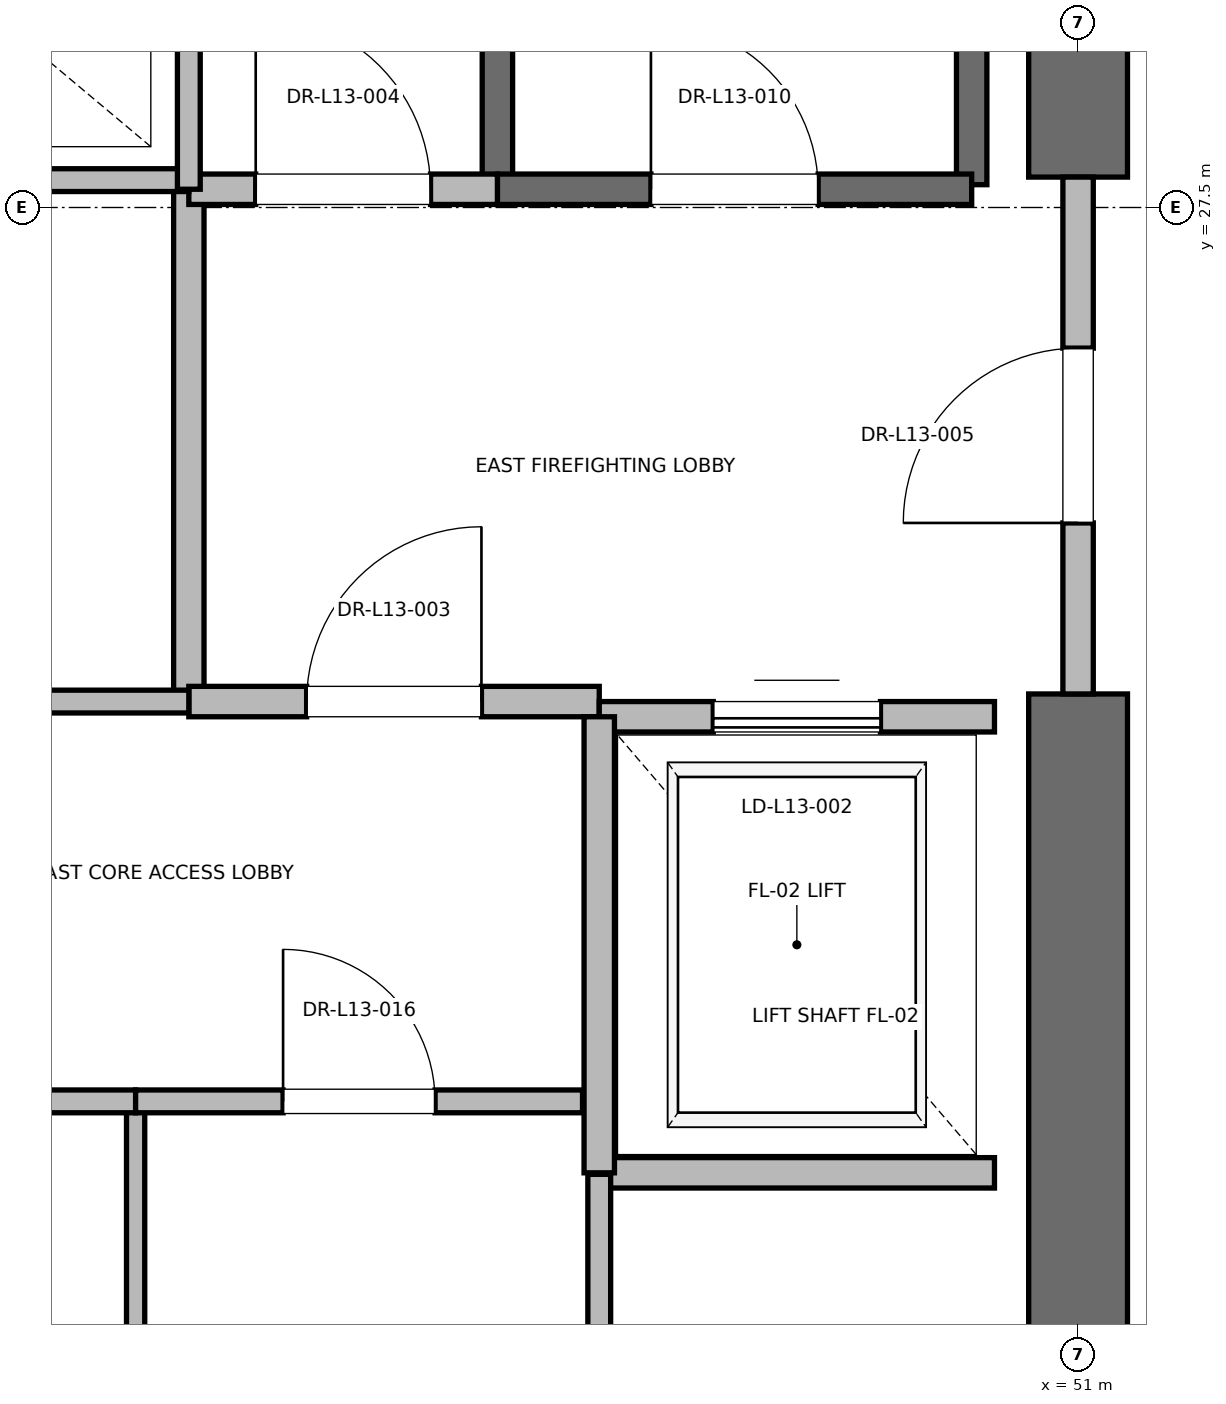
"""IFC4 building model, lengths in metres.
Left out: names, types, materials, properties, quantities, classifications, styles, units other than length and angle.
Written with IfcOpenShell. Run it as: python <this file> out.ifc"""

import sys

from ifc_helpers import new_model, si_unit, direction, frame, frame_2d, origin, place, context, subcontext, project, spatial, rectangle, extrude, element, fill, save


model = new_model("IFC4")
c1 = context("Model", 3, precision=1e-05, world=origin(), true_north=direction((0.0, 1.0)))
c2 = subcontext(c1, "Body", "Model", "MODEL_VIEW")
j1 = project(units=[si_unit("LENGTHUNIT", "METRE"), si_unit("PLANEANGLEUNIT", "RADIAN")], contexts=[c1])
p1 = place(None, origin())
s1 = spatial("IfcSite", under=j1, at=p1, CompositionType="ELEMENT")
p2 = place(p1, origin())
s2 = spatial("IfcBuilding", under=s1, at=p2, CompositionType="ELEMENT")
p3 = place(p2, frame((0.0, 0.0, 59.6)))
s3 = spatial("IfcBuildingStorey", under=s2, at=p3, CompositionType="ELEMENT", Elevation=59.6)
p4 = place(p3, frame((51.0, 18.5, 0.0), z_axis=(0.0, 0.0, 1.0), x_axis=(0.0, 1.0, 0.0)))
e1 = element("IfcWall", 1, at=p4, inside=s3, PredefinedType="SHEAR", context=c2, shape_type="SweptSolid", body=[
    extrude(rectangle(XDim=5.8, YDim=0.65, at=frame_2d((2.9, 0.0))), origin(), (0.0, 0.0, 1.0), 3.76),
])
p5 = place(p3, frame((51.0, 27.7, 0.0), z_axis=(0.0, 0.0, 1.0), x_axis=(0.0, 1.0, 0.0)))
e2 = element("IfcWall", 2, at=p5, inside=s3, PredefinedType="SHEAR", context=c2, shape_type="SweptSolid", body=[
    extrude(rectangle(XDim=8.8, YDim=0.65, at=frame_2d((4.4, 0.0))), origin(), (0.0, 0.0, 1.0), 3.76),
])
p6 = place(p3, frame((50.3, 27.65, 0.0), z_axis=(0.0, 0.0, 1.0), x_axis=(0.0, 1.0, 0.0)))
e3 = element("IfcWall", 3, at=p6, inside=s3, PredefinedType="SOLIDWALL", context=c2, shape_type="SweptSolid", body=[
    extrude(rectangle(XDim=8.15, YDim=0.2, at=frame_2d((4.075, 0.0))), origin(), (0.0, 0.0, 1.0), 3.76),
])
p7 = place(p3, frame((47.18, 27.62, 0.0), z_axis=(0.0, 0.0, 1.0), x_axis=(0.0, 1.0, 0.0)))
e4 = element("IfcWall", 4, at=p7, inside=s3, PredefinedType="SOLIDWALL", context=c2, shape_type="SweptSolid", body=[
    extrude(rectangle(XDim=8.18, YDim=0.2, at=frame_2d((4.09, 0.0))), origin(), (0.0, 0.0, 1.0), 3.76),
])
p8 = place(p3, frame((47.18, 27.62, 0.0), z_axis=(0.0, 0.0, 1.0), x_axis=(1.0, 0.0, 0.0)))
e5 = element("IfcWall", 5, at=p8, inside=s3, PredefinedType="SOLIDWALL", context=c2, shape_type="SweptSolid", body=[
    extrude(rectangle(XDim=3.12, YDim=0.2, at=frame_2d((1.56, 0.0))), origin(), (0.0, 0.0, 1.0), 3.76),
])
p9 = place(p8, frame((1.01, 0.0, 0.0)))
e6 = element("IfcOpeningElement", 6, at=p9, cuts=e5, PredefinedType="OPENING", context=c2, shape_type="SweptSolid", body=[
    extrude(rectangle(XDim=1.1, YDim=2.15, at=frame_2d((0.55, 1.075))), frame((0.0, 0.1, 0.0), z_axis=(0.0, -1.0, 0.0), x_axis=(1.0, 0.0, 0.0)), (0.0, 0.0, 1.0), 0.2),
])
p10 = place(p3, frame((45.15, 24.25, 0.0), z_axis=(0.0, 0.0, 1.0), x_axis=(0.0, 1.0, 0.0)))
e7 = element("IfcWall", 7, at=p10, inside=s3, PredefinedType="PARTITIONING", context=c2, shape_type="SweptSolid", body=[
    extrude(rectangle(XDim=3.37, YDim=0.2, at=frame_2d((1.685, 0.0))), origin(), (0.0, 0.0, 1.0), 3.76),
])
p11 = place(p3, frame((45.15, 24.25, 0.0), z_axis=(0.0, 0.0, 1.0), x_axis=(1.0, 0.0, 0.0)))
e8 = element("IfcWall", 8, at=p11, inside=s3, PredefinedType="PARTITIONING", context=c2, shape_type="SweptSolid", body=[
    extrude(rectangle(XDim=2.7, YDim=0.2, at=frame_2d((1.35, 0.0))), origin(), (0.0, 0.0, 1.0), 3.76),
])
p12 = place(p11, frame((0.775, 0.0, 0.0)))
e9 = element("IfcOpeningElement", 9, at=p12, cuts=e8, PredefinedType="OPENING", context=c2, shape_type="SweptSolid", body=[
    extrude(rectangle(XDim=1.15, YDim=2.2, at=frame_2d((0.575, 1.1))), frame((0.0, 0.1, 0.0), z_axis=(0.0, -1.0, 0.0), x_axis=(1.0, 0.0, 0.0)), (0.0, 0.0, 1.0), 0.2),
])
p13 = place(p3, frame((45.15, 27.62, 0.0), z_axis=(0.0, 0.0, 1.0), x_axis=(1.0, 0.0, 0.0)))
e10 = element("IfcWall", 10, at=p13, inside=s3, PredefinedType="PARTITIONING", context=c2, shape_type="SweptSolid", body=[
    extrude(rectangle(XDim=2.03, YDim=0.2, at=frame_2d((1.015, 0.0))), origin(), (0.0, 0.0, 1.0), 3.76),
])
p14 = place(p13, frame((0.44, 0.0, 0.0)))
e11 = element("IfcOpeningElement", 11, at=p14, cuts=e10, PredefinedType="OPENING", context=c2, shape_type="SweptSolid", body=[
    extrude(rectangle(XDim=1.15, YDim=2.2, at=frame_2d((0.575, 1.1))), frame((0.0, 0.1, 0.0), z_axis=(0.0, -1.0, 0.0), x_axis=(1.0, 0.0, 0.0)), (0.0, 0.0, 1.0), 0.2),
])
p15 = place(p3, frame((51.0, 24.3, 0.0), z_axis=(0.0, 0.0, 1.0), x_axis=(0.0, 1.0, 0.0)))
e12 = element("IfcWall", 12, at=p15, inside=s3, PredefinedType="PARTITIONING", context=c2, shape_type="SweptSolid", body=[
    extrude(rectangle(XDim=3.4, YDim=0.2, at=frame_2d((1.7, 0.0))), origin(), (0.0, 0.0, 1.0), 2.54),
])
p16 = place(p15, frame((1.125, 0.0, 0.0)))
e13 = element("IfcOpeningElement", 13, at=p16, cuts=e12, PredefinedType="OPENING", context=c2, shape_type="SweptSolid", body=[
    extrude(rectangle(XDim=1.15, YDim=2.2, at=frame_2d((0.575, 1.1))), frame((0.0, 0.1, 0.0), z_axis=(0.0, -1.0, 0.0), x_axis=(1.0, 0.0, 0.0)), (0.0, 0.0, 1.0), 0.2),
])
p17 = place(p3, frame((47.85, 21.15, 0.0), z_axis=(0.0, 0.0, 1.0), x_axis=(1.0, 0.0, 0.0)))
e14 = element("IfcWall", 14, at=p17, inside=s3, PredefinedType="SOLIDWALL", context=c2, shape_type="SweptSolid", body=[
    extrude(rectangle(XDim=2.6, YDim=0.2, at=frame_2d((1.3, 0.0))), origin(), (0.0, 0.0, 1.0), 3.76),
])
p18 = place(p3, frame((50.45, 24.15, 0.0), z_axis=(0.0, 0.0, 1.0), x_axis=(-1.0, 0.0, 0.0)))
e15 = element("IfcWall", 15, at=p18, inside=s3, PredefinedType="SOLIDWALL", context=c2, shape_type="SweptSolid", body=[
    extrude(rectangle(XDim=2.6, YDim=0.2, at=frame_2d((1.3, 0.0))), origin(), (0.0, 0.0, 1.0), 2.54),
])
p19 = place(p18, frame((0.75, 0.0, 0.0)))
e16 = element("IfcOpeningElement", 16, at=p19, cuts=e15, PredefinedType="OPENING", context=c2, shape_type="SweptSolid", body=[
    extrude(rectangle(XDim=1.1, YDim=2.2, at=frame_2d((0.55, 1.1))), frame((0.0, 0.1, 0.0), z_axis=(0.0, -1.0, 0.0), x_axis=(1.0, 0.0, 0.0)), (0.0, 0.0, 1.0), 0.2),
])
p20 = place(p3, frame((47.85, 24.15, 0.0), z_axis=(0.0, 0.0, 1.0), x_axis=(0.0, -1.0, 0.0)))
e17 = element("IfcWall", 17, at=p20, inside=s3, PredefinedType="SOLIDWALL", context=c2, shape_type="SweptSolid", body=[
    extrude(rectangle(XDim=3.0, YDim=0.2, at=frame_2d((1.5, 0.0))), origin(), (0.0, 0.0, 1.0), 3.76),
])
p21 = place(p3, frame((41.56, 27.68, 0.0), z_axis=(0.0, 0.0, 1.0), x_axis=(1.0, 0.0, 0.0)))
e18 = element("IfcWall", 18, at=p21, inside=s3, PredefinedType="PARTITIONING", context=c2, shape_type="SweptSolid", body=[
    extrude(rectangle(XDim=3.59, YDim=0.15, at=frame_2d((1.795, 0.0))), origin(), (0.0, 0.0, 1.0), 2.85),
])
p22 = place(p3, frame((47.85, 18.6, 0.0), z_axis=(0.0, 0.0, 1.0), x_axis=(0.0, 1.0, 0.0)))
e19 = element("IfcWall", 19, at=p22, inside=s3, PredefinedType="PARTITIONING", context=c2, shape_type="SweptSolid", body=[
    extrude(rectangle(XDim=2.54, YDim=0.15, at=frame_2d((1.27, 0.0))), origin(), (0.0, 0.0, 1.0), 2.85),
])
p23 = place(p3, frame((44.8, 18.6, 0.0), z_axis=(0.0, 0.0, 1.0), x_axis=(0.0, 1.0, 0.0)))
e20 = element("IfcWall", 20, at=p23, inside=s3, PredefinedType="PARTITIONING", context=c2, shape_type="SweptSolid", body=[
    extrude(rectangle(XDim=3.02, YDim=0.12, at=frame_2d((1.51, 0.0))), origin(), (0.0, 0.0, 1.0), 2.85),
])
p24 = place(p3, frame((41.76, 21.62, 0.0), z_axis=(0.0, 0.0, 1.0), x_axis=(1.0, 0.0, 0.0)))
e21 = element("IfcWall", 21, at=p24, inside=s3, PredefinedType="PARTITIONING", context=c2, shape_type="SweptSolid", body=[
    extrude(rectangle(XDim=3.04, YDim=0.15, at=frame_2d((1.52, 0.0))), origin(), (0.0, 0.0, 1.0), 2.85),
])
p25 = place(p24, frame((1.02, 0.0, 0.0)))
e22 = element("IfcOpeningElement", 22, at=p25, cuts=e21, PredefinedType="OPENING", context=c2, shape_type="SweptSolid", body=[
    extrude(rectangle(XDim=1.0, YDim=2.15, at=frame_2d((0.5, 1.075))), frame((0.0, 0.075, 0.0), z_axis=(0.0, -1.0, 0.0), x_axis=(1.0, 0.0, 0.0)), (0.0, 0.0, 1.0), 0.15),
])
p26 = place(p3, frame((44.8, 21.62, 0.0), z_axis=(0.0, 0.0, 1.0), x_axis=(1.0, 0.0, 0.0)))
e23 = element("IfcWall", 23, at=p26, inside=s3, PredefinedType="PARTITIONING", context=c2, shape_type="SweptSolid", body=[
    extrude(rectangle(XDim=2.94, YDim=0.15, at=frame_2d((1.47, 0.0))), origin(), (0.0, 0.0, 1.0), 2.85),
])
p27 = place(p26, frame((0.97, 0.0, 0.0)))
e24 = element("IfcOpeningElement", 24, at=p27, cuts=e23, PredefinedType="OPENING", context=c2, shape_type="SweptSolid", body=[
    extrude(rectangle(XDim=1.0, YDim=2.15, at=frame_2d((0.5, 1.075))), frame((0.0, 0.075, 0.0), z_axis=(0.0, -1.0, 0.0), x_axis=(1.0, 0.0, 0.0)), (0.0, 0.0, 1.0), 0.15),
])
p28 = place(p3, frame((41.76, 24.25, 0.0), z_axis=(0.0, 0.0, 1.0), x_axis=(1.0, 0.0, 0.0)))
e25 = element("IfcWall", 25, at=p28, inside=s3, PredefinedType="PARTITIONING", context=c2, shape_type="SweptSolid", body=[
    extrude(rectangle(XDim=3.39, YDim=0.15, at=frame_2d((1.695, 0.0))), origin(), (0.0, 0.0, 1.0), 2.85),
])
p29 = place(p28, frame((1.255, 0.0, 0.0)))
e26 = element("IfcOpeningElement", 26, at=p29, cuts=e25, PredefinedType="OPENING", context=c2, shape_type="SweptSolid", body=[
    extrude(rectangle(XDim=0.88, YDim=2.1, at=frame_2d((0.44, 1.05))), frame((0.0, 0.075, 0.0), z_axis=(0.0, -1.0, 0.0), x_axis=(1.0, 0.0, 0.0)), (0.0, 0.0, 1.0), 0.15),
])
p30 = place(p3, frame((45.15, 27.62, 0.0), z_axis=(0.0, 0.0, 1.0), x_axis=(0.0, 1.0, 0.0)))
e27 = element("IfcWall", 27, at=p30, inside=s3, PredefinedType="PARTITIONING", context=c2, shape_type="SweptSolid", body=[
    extrude(rectangle(XDim=3.1, YDim=0.15, at=frame_2d((1.55, 0.0))), origin(), (0.0, 0.0, 1.0), 2.85),
])
p31 = place(p9, origin())
e28 = element("IfcDoor", 28, at=p31, inside=s3, OperationType="SINGLE_SWING_LEFT", PredefinedType="DOOR", context=c2, shape_type="SweptSolid", body=[
    extrude(rectangle(XDim=1.1, YDim=2.15, at=frame_2d((0.55, 1.075))), frame((0.0, 0.025, 0.0), z_axis=(0.0, -1.0, 0.0), x_axis=(1.0, 0.0, 0.0)), (0.0, 0.0, 1.0), 0.05),
])
fill(e6, e28)
p32 = place(p12, origin())
e29 = element("IfcDoor", 29, at=p32, inside=s3, OperationType="SINGLE_SWING_RIGHT", PredefinedType="DOOR", context=c2, shape_type="SweptSolid", body=[
    extrude(rectangle(XDim=1.15, YDim=2.2, at=frame_2d((0.575, 1.1))), frame((0.0, 0.025, 0.0), z_axis=(0.0, -1.0, 0.0), x_axis=(1.0, 0.0, 0.0)), (0.0, 0.0, 1.0), 0.05),
])
fill(e9, e29)
p33 = place(p14, origin())
e30 = element("IfcDoor", 30, at=p33, inside=s3, OperationType="SINGLE_SWING_LEFT", PredefinedType="DOOR", context=c2, shape_type="SweptSolid", body=[
    extrude(rectangle(XDim=1.15, YDim=2.2, at=frame_2d((0.575, 1.1))), frame((0.0, 0.025, 0.0), z_axis=(0.0, -1.0, 0.0), x_axis=(1.0, 0.0, 0.0)), (0.0, 0.0, 1.0), 0.05),
])
fill(e11, e30)
p34 = place(p16, origin())
e31 = element("IfcDoor", 31, at=p34, inside=s3, OperationType="SINGLE_SWING_LEFT", PredefinedType="DOOR", context=c2, shape_type="SweptSolid", body=[
    extrude(rectangle(XDim=1.15, YDim=2.2, at=frame_2d((0.575, 1.1))), frame((0.0, 0.025, 0.0), z_axis=(0.0, -1.0, 0.0), x_axis=(1.0, 0.0, 0.0)), (0.0, 0.0, 1.0), 0.05),
])
fill(e13, e31)
p35 = place(p19, origin())
e32 = element("IfcDoor", 32, at=p35, inside=s3, OperationType="SLIDING_TO_RIGHT", PredefinedType="DOOR", context=c2, shape_type="SweptSolid", body=[
    extrude(rectangle(XDim=1.1, YDim=2.2, at=frame_2d((0.55, 1.1))), frame((0.0, 0.025, 0.0), z_axis=(0.0, -1.0, 0.0), x_axis=(1.0, 0.0, 0.0)), (0.0, 0.0, 1.0), 0.05),
])
fill(e16, e32)
p36 = place(p27, origin())
e33 = element("IfcDoor", 33, at=p36, inside=s3, OperationType="SINGLE_SWING_LEFT", PredefinedType="DOOR", context=c2, shape_type="SweptSolid", body=[
    extrude(rectangle(XDim=1.0, YDim=2.15, at=frame_2d((0.5, 1.075))), frame((0.0, 0.025, 0.0), z_axis=(0.0, -1.0, 0.0), x_axis=(1.0, 0.0, 0.0)), (0.0, 0.0, 1.0), 0.05),
])
fill(e24, e33)
save(model, sys.argv[1])
